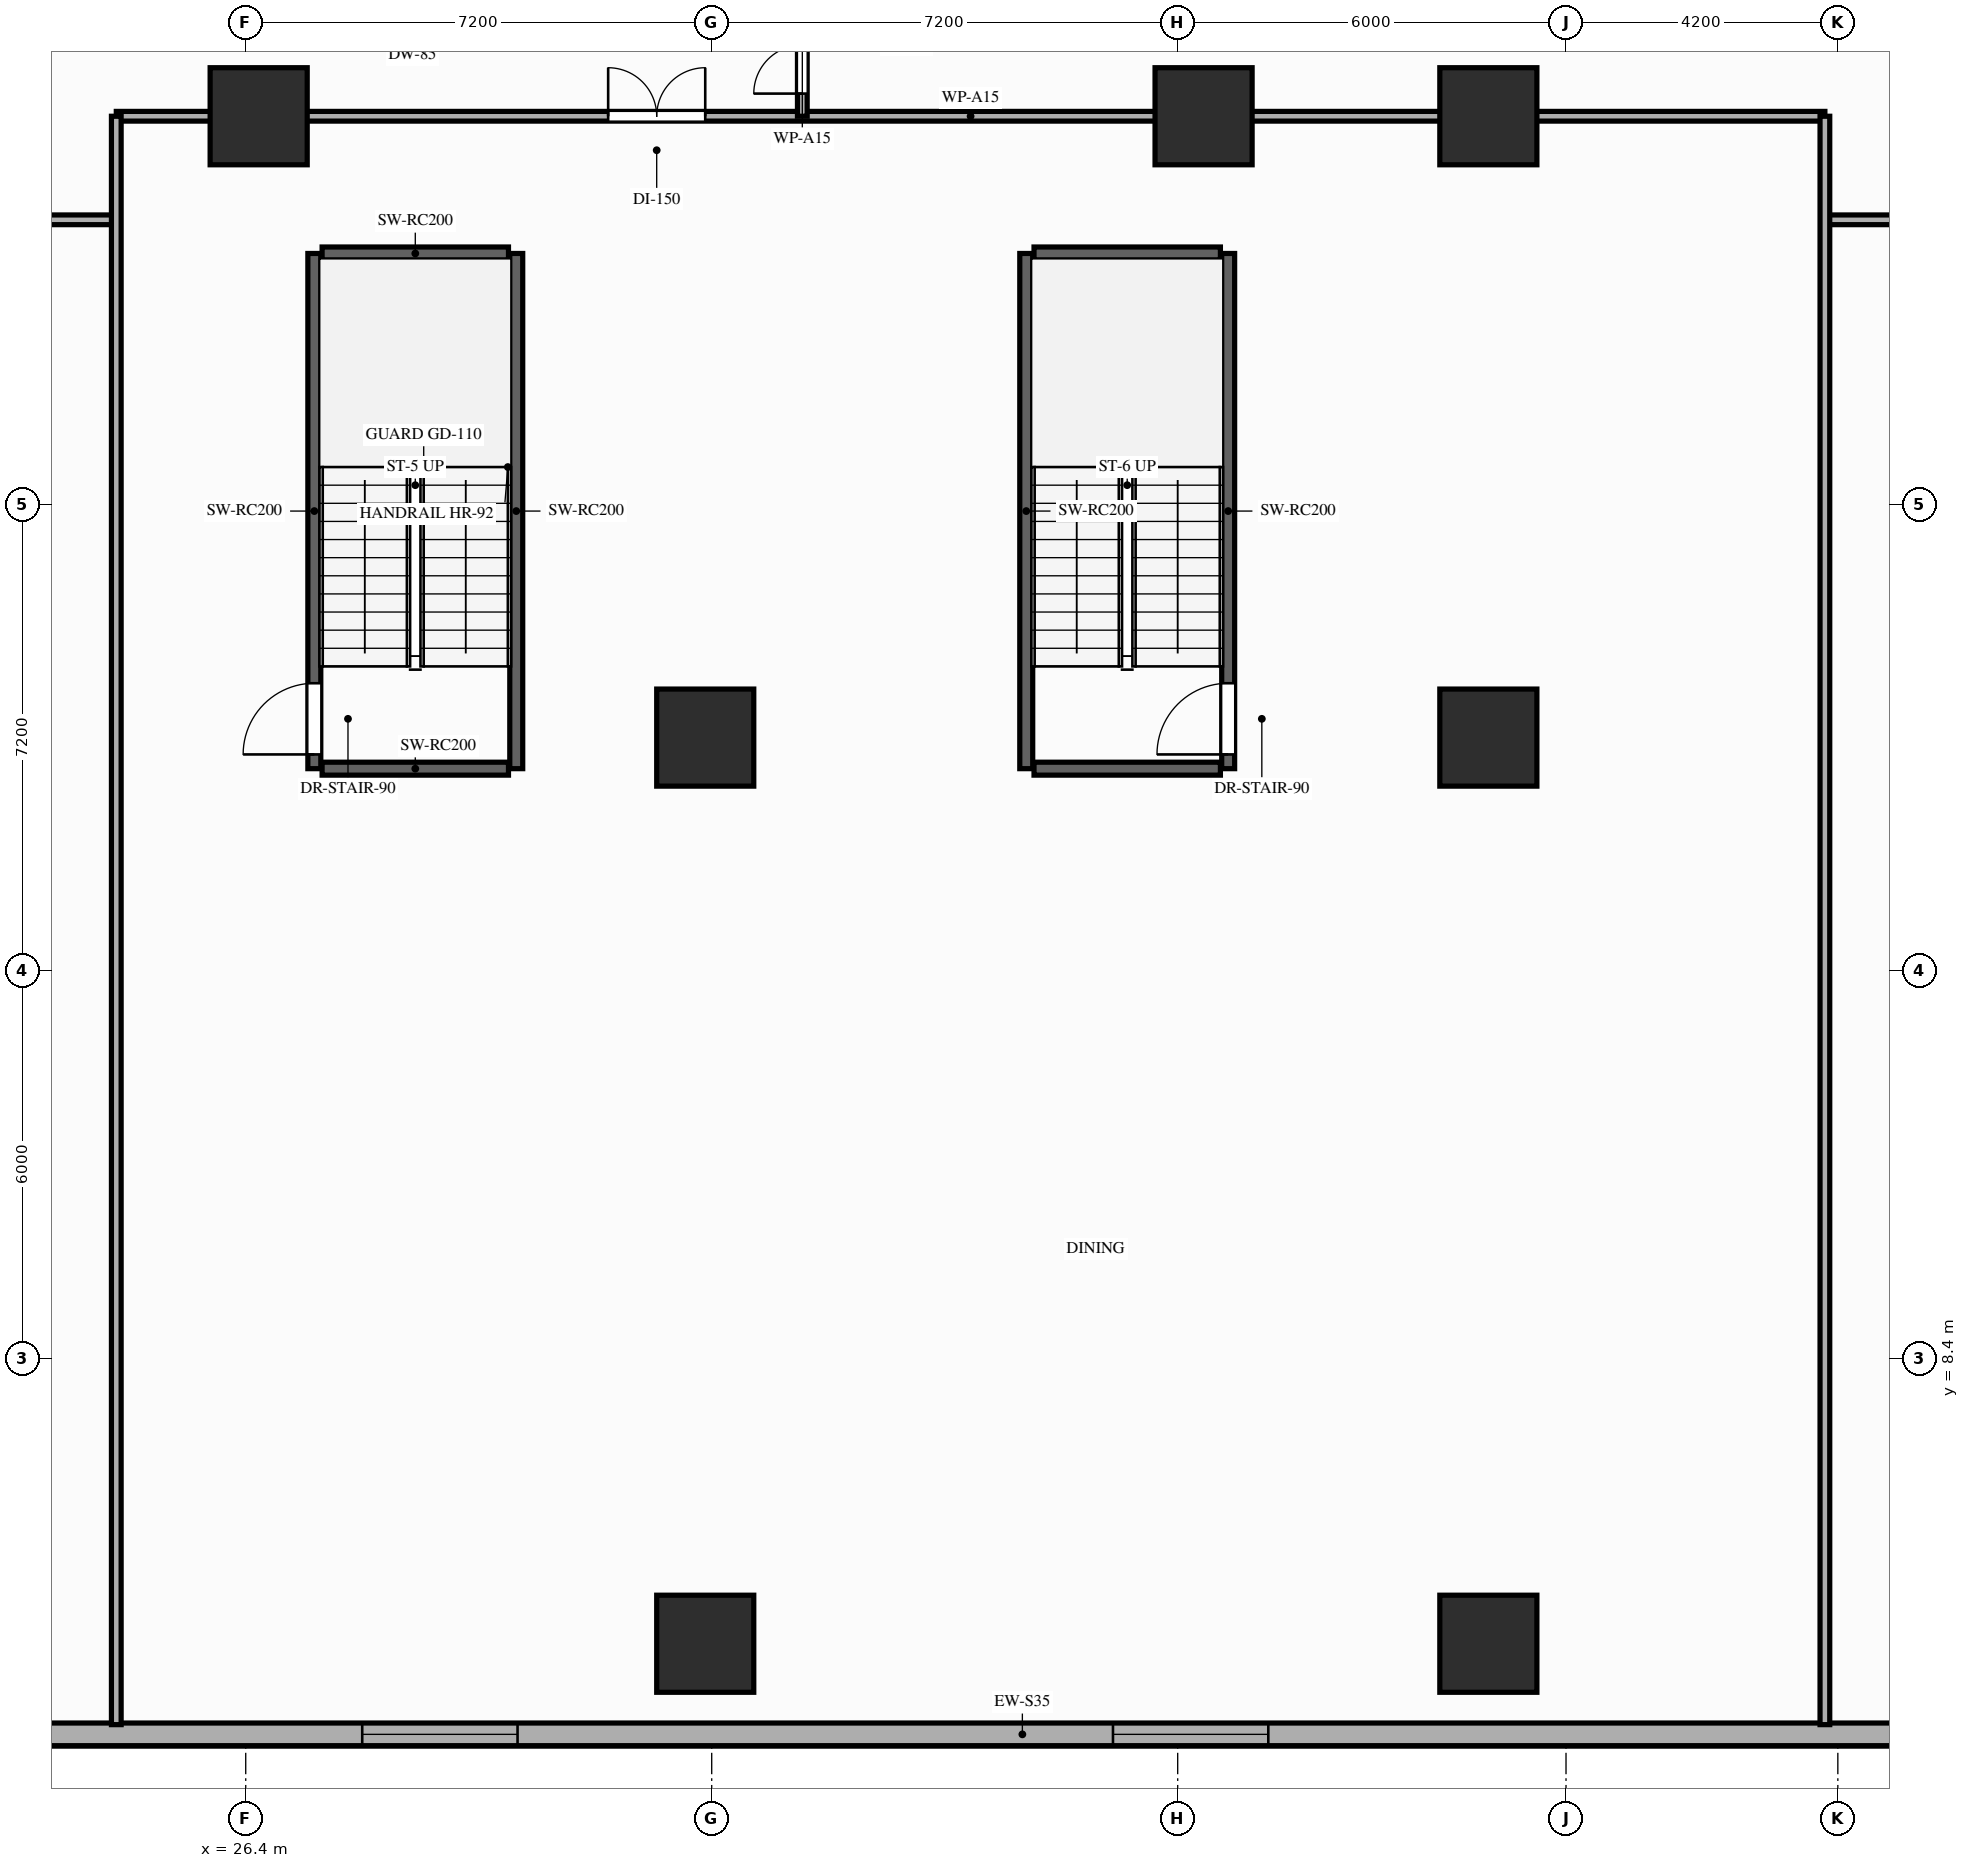
"""IFC4 building model, lengths in metres.
Left out: names, types, materials, properties, quantities, classifications, styles, units other than length and angle.
Written with IfcOpenShell. Run it as: python <this file> out.ifc"""

import sys

from ifc_helpers import new_model, si_unit, direction, frame, frame_2d, origin, origin_2d, place, context, subcontext, project, spatial, rectangle, extrude, element, fill, save


model = new_model("IFC4")
c1 = context("Model", 3, precision=1e-05, world=origin(), true_north=direction((0.0, 1.0)))
c2 = subcontext(c1, "Body", "Model", "MODEL_VIEW")
j1 = project(units=[si_unit("LENGTHUNIT", "METRE"), si_unit("PLANEANGLEUNIT", "RADIAN")], contexts=[c1])
p1 = place(None, origin())
s1 = spatial("IfcSite", under=j1, at=p1, CompositionType="ELEMENT")
p2 = place(p1, origin())
s2 = spatial("IfcBuilding", under=s1, at=p2, CompositionType="ELEMENT")
p3 = place(p2, frame((0.0, 0.0, 17.6)))
s3 = spatial("IfcBuildingStorey", under=s2, at=p3, CompositionType="ELEMENT", Elevation=17.6)
for number, where, z_axis, x_axis in (
    (1, (26.6, 27.6, 0.0), (0.0, 0.0, 1.0), (1.0, 0.0, 0.0)),
    (2, (41.2, 27.6, 0.0), (0.0, 0.0, 1.0), (1.0, 0.0, 0.0)),
    (3, (45.6, 27.6, 0.0), (0.0, 0.0, 1.0), (1.0, 0.0, 0.0)),
    (4, (33.5, 4.0, 0.0), (0.0, 0.0, 1.0), (1.0, 0.0, 0.0)),
    (5, (45.6, 4.0, 0.0), (0.0, 0.0, 1.0), (1.0, 0.0, 0.0)),
    (6, (33.5, 18.0, 0.0), (0.0, 0.0, 1.0), (1.0, 0.0, 0.0)),
    (7, (45.6, 18.0, 0.0), (0.0, 0.0, 1.0), (1.0, 0.0, 0.0)),
):
    element("IfcColumn", number, at=place(p3, frame(where, z_axis=z_axis, x_axis=x_axis)), inside=s3, PredefinedType="COLUMN", context=c2, shape_type="SweptSolid", body=[
        extrude(rectangle(XDim=1.5, YDim=1.5, at=origin_2d()), origin(), (0.0, 0.0, 1.0), 4.2),
    ])
p4 = place(p3, frame((3.6, 2.6, 0.0), z_axis=(0.0, 0.0, 1.0), x_axis=(1.0, 0.0, 0.0)))
e8 = element("IfcWall", 8, at=p4, inside=s3, PredefinedType="STANDARD", context=c2, shape_type="SweptSolid", body=[
    extrude(rectangle(XDim=69.6, YDim=0.35, at=frame_2d((34.8, 0.0))), origin(), (0.0, 0.0, 1.0), 3.9),
])
p5 = place(p4, frame((17.2, 0.0, 0.9)))
e9 = element("IfcOpeningElement", 9, at=p5, cuts=e8, PredefinedType="OPENING", context=c2, shape_type="SweptSolid", body=[
    extrude(rectangle(XDim=2.4, YDim=2.15, at=frame_2d((1.2, 1.075))), frame((0.0, 0.185, 0.0), z_axis=(0.0, -1.0, 0.0), x_axis=(1.0, 0.0, 0.0)), (0.0, 0.0, 1.0), 0.37),
])
p6 = place(p4, frame((24.6, 0.0, 0.9)))
e10 = element("IfcOpeningElement", 10, at=p6, cuts=e8, PredefinedType="OPENING", context=c2, shape_type="SweptSolid", body=[
    extrude(rectangle(XDim=2.4, YDim=2.15, at=frame_2d((1.2, 1.075))), frame((0.0, 0.185, 0.0), z_axis=(0.0, -1.0, 0.0), x_axis=(1.0, 0.0, 0.0)), (0.0, 0.0, 1.0), 0.37),
])
p7 = place(p4, frame((36.2, 0.0, 0.9)))
e11 = element("IfcOpeningElement", 11, at=p7, cuts=e8, PredefinedType="OPENING", context=c2, shape_type="SweptSolid", body=[
    extrude(rectangle(XDim=2.4, YDim=2.15, at=frame_2d((1.2, 1.075))), frame((0.0, 0.185, 0.0), z_axis=(0.0, -1.0, 0.0), x_axis=(1.0, 0.0, 0.0)), (0.0, 0.0, 1.0), 0.37),
])
p8 = place(p4, frame((48.4, 0.0, 0.9)))
e12 = element("IfcOpeningElement", 12, at=p8, cuts=e8, PredefinedType="OPENING", context=c2, shape_type="SweptSolid", body=[
    extrude(rectangle(XDim=2.4, YDim=2.15, at=frame_2d((1.2, 1.075))), frame((0.0, 0.185, 0.0), z_axis=(0.0, -1.0, 0.0), x_axis=(1.0, 0.0, 0.0)), (0.0, 0.0, 1.0), 0.37),
])
p9 = place(p4, frame((64.0, 0.0, 0.9)))
e13 = element("IfcOpeningElement", 13, at=p9, cuts=e8, PredefinedType="OPENING", context=c2, shape_type="SweptSolid", body=[
    extrude(rectangle(XDim=2.4, YDim=2.15, at=frame_2d((1.2, 1.075))), frame((0.0, 0.185, 0.0), z_axis=(0.0, -1.0, 0.0), x_axis=(1.0, 0.0, 0.0)), (0.0, 0.0, 1.0), 0.37),
])
p10 = place(p3, frame((27.46, 17.52, 0.0), z_axis=(0.0, 0.0, 1.0), x_axis=(0.0, 1.0, 0.0)))
e14 = element("IfcWall", 14, at=p10, inside=s3, PredefinedType="SHEAR", context=c2, shape_type="SweptSolid", body=[
    extrude(rectangle(XDim=7.96, YDim=0.2, at=frame_2d((3.98, 0.0))), origin(), (0.0, 0.0, 1.0), 3.9),
])
p11 = place(p10, frame((0.22, 0.0, 0.0)))
e15 = element("IfcOpeningElement", 15, at=p11, cuts=e14, PredefinedType="OPENING", context=c2, shape_type="SweptSolid", body=[
    extrude(rectangle(XDim=1.1, YDim=2.15, at=frame_2d((0.55, 1.075))), frame((0.0, 0.11, 0.0), z_axis=(0.0, -1.0, 0.0), x_axis=(1.0, 0.0, 0.0)), (0.0, 0.0, 1.0), 0.22),
])
p12 = place(p3, frame((30.58, 17.52, 0.0), z_axis=(0.0, 0.0, 1.0), x_axis=(0.0, 1.0, 0.0)))
e16 = element("IfcWall", 16, at=p12, inside=s3, PredefinedType="SHEAR", context=c2, shape_type="SweptSolid", body=[
    extrude(rectangle(XDim=7.96, YDim=0.2, at=frame_2d((3.98, 0.0))), origin(), (0.0, 0.0, 1.0), 3.9),
])
for number, where, z_axis, x_axis in (
    (17, (27.58, 25.48, 0.0), (0.0, 0.0, 1.0), (1.0, 0.0, 0.0)),
    (18, (27.58, 17.52, 0.0), (0.0, 0.0, 1.0), (1.0, 0.0, 0.0)),
):
    element("IfcWall", number, at=place(p3, frame(where, z_axis=z_axis, x_axis=x_axis)), inside=s3, PredefinedType="SHEAR", context=c2, shape_type="SweptSolid", body=[
        extrude(rectangle(XDim=2.88, YDim=0.2, at=frame_2d((1.44, 0.0))), origin(), (0.0, 0.0, 1.0), 3.9),
    ])
p13 = place(p3, frame((38.46, 17.52, 0.0), z_axis=(0.0, 0.0, 1.0), x_axis=(0.0, 1.0, 0.0)))
e19 = element("IfcWall", 19, at=p13, inside=s3, PredefinedType="SHEAR", context=c2, shape_type="SweptSolid", body=[
    extrude(rectangle(XDim=7.96, YDim=0.2, at=frame_2d((3.98, 0.0))), origin(), (0.0, 0.0, 1.0), 3.9),
])
p14 = place(p3, frame((41.58, 17.52, 0.0), z_axis=(0.0, 0.0, 1.0), x_axis=(0.0, 1.0, 0.0)))
e20 = element("IfcWall", 20, at=p14, inside=s3, PredefinedType="SHEAR", context=c2, shape_type="SweptSolid", body=[
    extrude(rectangle(XDim=7.96, YDim=0.2, at=frame_2d((3.98, 0.0))), origin(), (0.0, 0.0, 1.0), 3.9),
])
p15 = place(p14, frame((0.22, 0.0, 0.0)))
e21 = element("IfcOpeningElement", 21, at=p15, cuts=e20, PredefinedType="OPENING", context=c2, shape_type="SweptSolid", body=[
    extrude(rectangle(XDim=1.1, YDim=2.15, at=frame_2d((0.55, 1.075))), frame((0.0, 0.11, 0.0), z_axis=(0.0, -1.0, 0.0), x_axis=(1.0, 0.0, 0.0)), (0.0, 0.0, 1.0), 0.22),
])
for number, where, z_axis, x_axis in (
    (22, (38.58, 25.48, 0.0), (0.0, 0.0, 1.0), (1.0, 0.0, 0.0)),
    (23, (38.58, 17.52, 0.0), (0.0, 0.0, 1.0), (1.0, 0.0, 0.0)),
):
    element("IfcWall", number, at=place(p3, frame(where, z_axis=z_axis, x_axis=x_axis)), inside=s3, PredefinedType="SHEAR", context=c2, shape_type="SweptSolid", body=[
        extrude(rectangle(XDim=2.88, YDim=0.2, at=frame_2d((1.44, 0.0))), origin(), (0.0, 0.0, 1.0), 3.9),
    ])
p16 = place(p3, frame((6.6, 26.0, 0.0), z_axis=(0.0, 0.0, 1.0), x_axis=(1.0, 0.0, 0.0)))
e24 = element("IfcWall", 24, at=p16, inside=s3, PredefinedType="PARTITIONING", context=c2, shape_type="SweptSolid", body=[
    extrude(rectangle(XDim=17.8, YDim=0.15, at=frame_2d((8.9, 0.0))), origin(), (0.0, 0.0, 1.0), 3.18),
])
p17 = place(p16, frame((9.4, 0.0, 0.0)))
e25 = element("IfcOpeningElement", 25, at=p17, cuts=e24, PredefinedType="OPENING", context=c2, shape_type="SweptSolid", body=[
    extrude(rectangle(XDim=1.5, YDim=2.18, at=frame_2d((0.75, 1.09))), frame((0.0, 0.085, 0.0), z_axis=(0.0, -1.0, 0.0), x_axis=(1.0, 0.0, 0.0)), (0.0, 0.0, 1.0), 0.17),
])
p18 = place(p3, frame((24.4, 27.6, 0.0), z_axis=(0.0, 0.0, 1.0), x_axis=(1.0, 0.0, 0.0)))
e26 = element("IfcWall", 26, at=p18, inside=s3, PredefinedType="PARTITIONING", context=c2, shape_type="SweptSolid", body=[
    extrude(rectangle(XDim=26.4, YDim=0.15, at=frame_2d((13.2, 0.0))), origin(), (0.0, 0.0, 1.0), 3.18),
])
p19 = place(p18, frame((7.6, 0.0, 0.0)))
e27 = element("IfcOpeningElement", 27, at=p19, cuts=e26, PredefinedType="OPENING", context=c2, shape_type="SweptSolid", body=[
    extrude(rectangle(XDim=1.5, YDim=2.18, at=frame_2d((0.75, 1.09))), frame((0.0, 0.085, 0.0), z_axis=(0.0, -1.0, 0.0), x_axis=(1.0, 0.0, 0.0)), (0.0, 0.0, 1.0), 0.17),
])
p20 = place(p3, frame((50.8, 26.0, 0.0), z_axis=(0.0, 0.0, 1.0), x_axis=(1.0, 0.0, 0.0)))
e28 = element("IfcWall", 28, at=p20, inside=s3, PredefinedType="PARTITIONING", context=c2, shape_type="SweptSolid", body=[
    extrude(rectangle(XDim=11.6, YDim=0.15, at=frame_2d((5.8, 0.0))), origin(), (0.0, 0.0, 1.0), 3.18),
])
p21 = place(p20, frame((3.7, 0.0, 0.0)))
e29 = element("IfcOpeningElement", 29, at=p21, cuts=e28, PredefinedType="OPENING", context=c2, shape_type="SweptSolid", body=[
    extrude(rectangle(XDim=1.5, YDim=2.18, at=frame_2d((0.75, 1.09))), frame((0.0, 0.085, 0.0), z_axis=(0.0, -1.0, 0.0), x_axis=(1.0, 0.0, 0.0)), (0.0, 0.0, 1.0), 0.17),
])
p22 = place(p3, frame((35.0, 27.6, 0.0), z_axis=(0.0, 0.0, 1.0), x_axis=(0.0, 1.0, 0.0)))
e30 = element("IfcWall", 30, at=p22, inside=s3, PredefinedType="PARTITIONING", context=c2, shape_type="SweptSolid", body=[
    extrude(rectangle(XDim=2.2, YDim=0.15, at=frame_2d((1.1, 0.0))), origin(), (0.0, 0.0, 1.0), 3.18),
])
p23 = place(p22, frame((0.35, 0.0, 0.0)))
e31 = element("IfcOpeningElement", 31, at=p23, cuts=e30, PredefinedType="OPENING", context=c2, shape_type="SweptSolid", body=[
    extrude(rectangle(XDim=1.5, YDim=2.18, at=frame_2d((0.75, 1.09))), frame((0.0, 0.085, 0.0), z_axis=(0.0, -1.0, 0.0), x_axis=(1.0, 0.0, 0.0)), (0.0, 0.0, 1.0), 0.17),
])
for number, where, z_axis, x_axis in (
    (32, (24.4, 2.75, 0.0), (0.0, 0.0, 1.0), (0.0, 1.0, 0.0)),
    (33, (50.8, 2.75, 0.0), (0.0, 0.0, 1.0), (0.0, 1.0, 0.0)),
):
    element("IfcWall", number, at=place(p3, frame(where, z_axis=z_axis, x_axis=x_axis)), inside=s3, PredefinedType="PARTITIONING", context=c2, shape_type="SweptSolid", body=[
        extrude(rectangle(XDim=24.85, YDim=0.15, at=frame_2d((12.425, 0.0))), origin(), (0.0, 0.0, 1.0), 3.9),
    ])
p24 = place(p6, origin())
e34 = element("IfcWindow", 34, at=p24, inside=s3, PartitioningType="SINGLE_PANEL", PredefinedType="WINDOW", context=c2, shape_type="SweptSolid", body=[
    extrude(rectangle(XDim=2.4, YDim=2.15, at=frame_2d((1.2, 1.075))), frame((0.0, 0.03, 0.0), z_axis=(0.0, -1.0, 0.0), x_axis=(1.0, 0.0, 0.0)), (0.0, 0.0, 1.0), 0.06),
])
fill(e10, e34)
p25 = place(p7, origin())
e35 = element("IfcWindow", 35, at=p25, inside=s3, PartitioningType="SINGLE_PANEL", PredefinedType="WINDOW", context=c2, shape_type="SweptSolid", body=[
    extrude(rectangle(XDim=2.4, YDim=2.15, at=frame_2d((1.2, 1.075))), frame((0.0, 0.03, 0.0), z_axis=(0.0, -1.0, 0.0), x_axis=(1.0, 0.0, 0.0)), (0.0, 0.0, 1.0), 0.06),
])
fill(e11, e35)
p26 = place(p11, origin())
e36 = element("IfcDoor", 36, at=p26, inside=s3, OperationType="SINGLE_SWING_LEFT", PredefinedType="DOOR", context=c2, shape_type="SweptSolid", body=[
    extrude(rectangle(XDim=1.1, YDim=2.15, at=frame_2d((0.55, 1.075))), frame((0.0, 0.025, 0.0), z_axis=(0.0, -1.0, 0.0), x_axis=(1.0, 0.0, 0.0)), (0.0, 0.0, 1.0), 0.05),
])
fill(e15, e36)
p27 = place(p15, origin())
e37 = element("IfcDoor", 37, at=p27, inside=s3, OperationType="SINGLE_SWING_LEFT", PredefinedType="DOOR", context=c2, shape_type="SweptSolid", body=[
    extrude(rectangle(XDim=1.1, YDim=2.15, at=frame_2d((0.55, 1.075))), frame((0.0, 0.025, 0.0), z_axis=(0.0, -1.0, 0.0), x_axis=(1.0, 0.0, 0.0)), (0.0, 0.0, 1.0), 0.05),
])
fill(e21, e37)
p28 = place(p23, origin())
e38 = element("IfcDoor", 38, at=p28, inside=s3, OperationType="DOUBLE_DOOR_SINGLE_SWING", PredefinedType="DOOR", context=c2, shape_type="SweptSolid", body=[
    extrude(rectangle(XDim=1.5, YDim=2.18, at=frame_2d((0.75, 1.09))), frame((0.0, 0.025, 0.0), z_axis=(0.0, -1.0, 0.0), x_axis=(1.0, 0.0, 0.0)), (0.0, 0.0, 1.0), 0.05),
])
fill(e31, e38)
p29 = place(p19, origin())
e39 = element("IfcDoor", 39, at=p29, inside=s3, OperationType="DOUBLE_DOOR_SINGLE_SWING", PredefinedType="DOOR", context=c2, shape_type="SweptSolid", body=[
    extrude(rectangle(XDim=1.5, YDim=2.18, at=frame_2d((0.75, 1.09))), frame((0.0, 0.025, 0.0), z_axis=(0.0, -1.0, 0.0), x_axis=(1.0, 0.0, 0.0)), (0.0, 0.0, 1.0), 0.05),
])
fill(e27, e39)
save(model, sys.argv[1])
